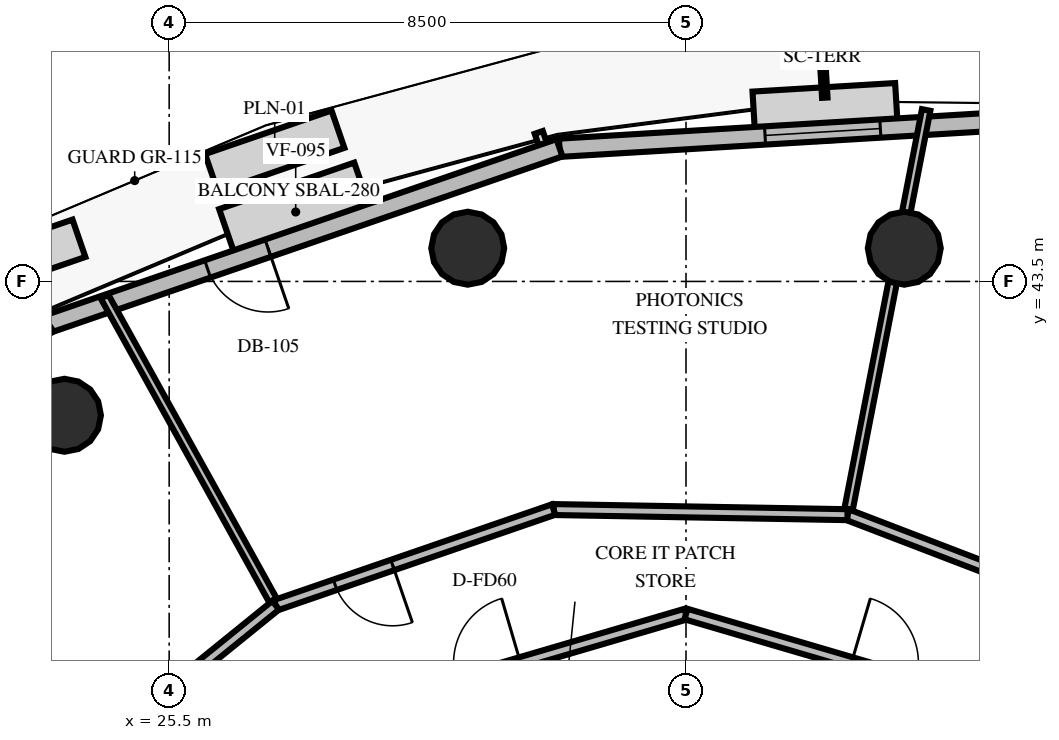
"""IFC4 building model, lengths in metres.
Left out: names, types, materials, properties, quantities, classifications, styles, units other than length and angle.
Written with IfcOpenShell. Run it as: python <this file> out.ifc"""

import sys

from ifc_helpers import new_model, si_unit, direction, frame, frame_2d, origin, origin_2d, place, context, subcontext, project, spatial, rectangle, circle, extrude, element, fill, save


model = new_model("IFC4")
c1 = context("Model", 3, precision=1e-05, world=origin(), true_north=direction((0.0, 1.0)))
c2 = subcontext(c1, "Body", "Model", "MODEL_VIEW")
j1 = project(units=[si_unit("LENGTHUNIT", "METRE"), si_unit("PLANEANGLEUNIT", "RADIAN")], contexts=[c1])
p1 = place(None, origin())
s1 = spatial("IfcSite", under=j1, at=p1, CompositionType="ELEMENT")
p2 = place(p1, origin())
s2 = spatial("IfcBuilding", under=s1, at=p2, CompositionType="ELEMENT")
p3 = place(p2, frame((0.0, 0.0, 113.8)))
s3 = spatial("IfcBuildingStorey", under=s2, at=p3, CompositionType="ELEMENT", Elevation=113.8)
for number, where, z_axis, x_axis in (
    (1, (37.59, 44.046, 0.0), (0.0, 0.0, 1.0), (1.0, 0.0, 0.0)),
    (2, (30.41, 44.046, 0.0), (0.0, 0.0, 1.0), (1.0, 0.0, 0.0)),
    (3, (23.778, 41.299, 0.0), (0.0, 0.0, 1.0), (1.0, 0.0, 0.0)),
):
    element("IfcColumn", number, at=place(p3, frame(where, z_axis=z_axis, x_axis=x_axis)), inside=s3, PredefinedType="COLUMN", context=c2, shape_type="SweptSolid", body=[
        extrude(circle(Radius=0.6, at=origin_2d()), origin(), (0.0, 0.0, 1.0), 4.0),
    ])
p4 = place(p3, frame((40.576, 46.217, 0.0), z_axis=(0.0, 0.0, 1.0), x_axis=(-0.998210999653, -0.059789632646, 0.0)))
e4 = element("IfcWall", 4, at=p4, inside=s3, PredefinedType="SOLIDWALL", context=c2, shape_type="SweptSolid", body=[
    extrude(rectangle(XDim=8.673, YDim=0.3, at=frame_2d((4.336, 0.0))), origin(), (0.0, 0.0, 1.0), 2.9),
])
p5 = place(p4, frame((3.386, 0.0, 0.8)))
e5 = element("IfcOpeningElement", 5, at=p5, cuts=e4, PredefinedType="OPENING", context=c2, shape_type="SweptSolid", body=[
    extrude(rectangle(XDim=1.9, YDim=1.95, at=frame_2d((0.95, 0.975))), frame((0.0, 0.16, 0.0), z_axis=(0.0, -1.0, 0.0), x_axis=(1.0, 0.0, 0.0)), (0.0, 0.0, 1.0), 0.32),
])
p6 = place(p3, frame((31.919, 45.698, 0.0), z_axis=(0.0, 0.0, 1.0), x_axis=(-0.945509178588, -0.325595444079, 0.0)))
e6 = element("IfcWall", 6, at=p6, inside=s3, PredefinedType="SOLIDWALL", context=c2, shape_type="SweptSolid", body=[
    extrude(rectangle(XDim=8.891, YDim=0.3, at=frame_2d((4.445, 0.0))), origin(), (0.0, 0.0, 1.0), 2.9),
])
p7 = place(p6, frame((5.07, 0.0, 0.0)))
e7 = element("IfcOpeningElement", 7, at=p7, cuts=e6, PredefinedType="OPENING", context=c2, shape_type="SweptSolid", body=[
    extrude(rectangle(XDim=1.05, YDim=2.15, at=frame_2d((0.525, 1.075))), frame((0.0, 0.16, 0.0), z_axis=(0.0, -1.0, 0.0), x_axis=(1.0, 0.0, 0.0)), (0.0, 0.0, 1.0), 0.32),
])
p8 = place(p3, frame((23.513, 42.803, 0.0), z_axis=(0.0, 0.0, 1.0), x_axis=(-0.823433656397, -0.567412560235, 0.0)))
e8 = element("IfcWall", 8, at=p8, inside=s3, PredefinedType="SOLIDWALL", context=c2, shape_type="SweptSolid", body=[
    extrude(rectangle(XDim=8.673, YDim=0.3, at=frame_2d((4.336, 0.0))), origin(), (0.0, 0.0, 1.0), 2.9),
])
p9 = place(p8, frame((3.386, 0.0, 0.8)))
e9 = element("IfcOpeningElement", 9, at=p9, cuts=e8, PredefinedType="OPENING", context=c2, shape_type="SweptSolid", body=[
    extrude(rectangle(XDim=1.9, YDim=1.95, at=frame_2d((0.95, 0.975))), frame((0.0, 0.16, 0.0), z_axis=(0.0, -1.0, 0.0), x_axis=(1.0, 0.0, 0.0)), (0.0, 0.0, 1.0), 0.32),
])
p10 = place(p3, frame((27.5, 36.123, 0.0), z_axis=(0.0, 0.0, 1.0), x_axis=(0.959546654541, 0.281549671923, 0.0)))
e10 = element("IfcWall", 10, at=p10, inside=s3, PredefinedType="PARTITIONING", context=c2, shape_type="SweptSolid", body=[
    extrude(rectangle(XDim=6.774, YDim=0.18, at=frame_2d((3.387, 0.0))), origin(), (0.0, 0.0, 1.0), 2.8),
])
p11 = place(p10, frame((2.837, 0.0, 0.0)))
e11 = element("IfcOpeningElement", 11, at=p11, cuts=e10, PredefinedType="OPENING", context=c2, shape_type="SweptSolid", body=[
    extrude(rectangle(XDim=1.1, YDim=2.15, at=frame_2d((0.55, 1.075))), frame((0.0, 0.1, 0.0), z_axis=(0.0, -1.0, 0.0), x_axis=(1.0, 0.0, 0.0)), (0.0, 0.0, 1.0), 0.2),
])
p12 = place(p3, frame((34.0, 38.03, 0.0), z_axis=(0.0, 0.0, 1.0), x_axis=(0.959546654541, -0.281549671923, 0.0)))
e12 = element("IfcWall", 12, at=p12, inside=s3, PredefinedType="PARTITIONING", context=c2, shape_type="SweptSolid", body=[
    extrude(rectangle(XDim=6.774, YDim=0.18, at=frame_2d((3.387, 0.0))), origin(), (0.0, 0.0, 1.0), 2.8),
])
p13 = place(p12, frame((2.837, 0.0, 0.0)))
e13 = element("IfcOpeningElement", 13, at=p13, cuts=e12, PredefinedType="OPENING", context=c2, shape_type="SweptSolid", body=[
    extrude(rectangle(XDim=1.1, YDim=2.15, at=frame_2d((0.55, 1.075))), frame((0.0, 0.1, 0.0), z_axis=(0.0, -1.0, 0.0), x_axis=(1.0, 0.0, 0.0)), (0.0, 0.0, 1.0), 0.2),
])
p14 = place(p3, frame((36.656, 39.664, 0.0), z_axis=(0.0, 0.0, 1.0), x_axis=(0.190815684343, 0.981625883221, 0.0)))
e14 = element("IfcWall", 14, at=p14, inside=s3, PredefinedType="PARTITIONING", context=c2, shape_type="SweptSolid", body=[
    extrude(rectangle(XDim=6.78, YDim=0.14, at=frame_2d((3.39, 0.0))), origin(), (0.0, 0.0, 1.0), 2.8),
])
p15 = place(p3, frame((41.169, 37.932, 0.0), z_axis=(0.0, 0.0, 1.0), x_axis=(-0.933582294394, 0.35836308347, 0.0)))
e15 = element("IfcWall", 15, at=p15, inside=s3, PredefinedType="PARTITIONING", context=c2, shape_type="SweptSolid", body=[
    extrude(rectangle(XDim=4.834, YDim=0.18, at=frame_2d((2.417, 0.0))), origin(), (0.0, 0.0, 1.0), 2.8),
])
p16 = place(p3, frame((27.251, 38.175, 0.0), z_axis=(0.0, 0.0, 1.0), x_axis=(-0.484806879047, 0.874621226605, 0.0)))
e16 = element("IfcWall", 16, at=p16, inside=s3, PredefinedType="PARTITIONING", context=c2, shape_type="SweptSolid", body=[
    extrude(rectangle(XDim=5.803, YDim=0.14, at=frame_2d((2.902, 0.0))), origin(), (0.0, 0.0, 1.0), 2.8),
])
p17 = place(p3, frame((36.656, 39.664, 0.0), z_axis=(0.0, 0.0, 1.0), x_axis=(-0.999848201787, 0.01742335739, 0.0)))
e17 = element("IfcWall", 17, at=p17, inside=s3, PredefinedType="PARTITIONING", context=c2, shape_type="SweptSolid", body=[
    extrude(rectangle(XDim=4.834, YDim=0.18, at=frame_2d((2.417, 0.0))), origin(), (0.0, 0.0, 1.0), 2.8),
])
p18 = place(p3, frame((31.823, 39.749, 0.0), z_axis=(0.0, 0.0, 1.0), x_axis=(-0.945531725064, -0.325529963134, 0.0)))
e18 = element("IfcWall", 18, at=p18, inside=s3, PredefinedType="PARTITIONING", context=c2, shape_type="SweptSolid", body=[
    extrude(rectangle(XDim=4.834, YDim=0.18, at=frame_2d((2.417, 0.0))), origin(), (0.0, 0.0, 1.0), 2.8),
])
p19 = place(p18, frame((2.801, 0.0, 0.0)))
e19 = element("IfcOpeningElement", 19, at=p19, cuts=e18, PredefinedType="OPENING", context=c2, shape_type="SweptSolid", body=[
    extrude(rectangle(XDim=1.0, YDim=2.15, at=frame_2d((0.5, 1.075))), frame((0.0, 0.1, 0.0), z_axis=(0.0, -1.0, 0.0), x_axis=(1.0, 0.0, 0.0)), (0.0, 0.0, 1.0), 0.2),
])
p20 = place(p3, frame((27.251, 38.175, 0.0), z_axis=(0.0, 0.0, 1.0), x_axis=(-0.777140194095, -0.629327513082, 0.0)))
e20 = element("IfcWall", 20, at=p20, inside=s3, PredefinedType="PARTITIONING", context=c2, shape_type="SweptSolid", body=[
    extrude(rectangle(XDim=4.834, YDim=0.18, at=frame_2d((2.417, 0.0))), origin(), (0.0, 0.0, 1.0), 2.8),
])
p21 = place(p20, frame((2.801, 0.0, 0.0)))
e21 = element("IfcOpeningElement", 21, at=p21, cuts=e20, PredefinedType="OPENING", context=c2, shape_type="SweptSolid", body=[
    extrude(rectangle(XDim=1.0, YDim=2.15, at=frame_2d((0.5, 1.075))), frame((0.0, 0.1, 0.0), z_axis=(0.0, -1.0, 0.0), x_axis=(1.0, 0.0, 0.0)), (0.0, 0.0, 1.0), 0.2),
])
p22 = place(p5, origin())
e22 = element("IfcWindow", 22, at=p22, inside=s3, PartitioningType="SINGLE_PANEL", PredefinedType="WINDOW", context=c2, shape_type="SweptSolid", body=[
    extrude(rectangle(XDim=1.9, YDim=1.95, at=frame_2d((0.95, 0.975))), frame((0.0, 0.03, 0.0), z_axis=(0.0, -1.0, 0.0), x_axis=(1.0, 0.0, 0.0)), (0.0, 0.0, 1.0), 0.06),
])
fill(e5, e22)
p23 = place(p7, origin())
e23 = element("IfcDoor", 23, at=p23, inside=s3, OperationType="SINGLE_SWING_LEFT", PredefinedType="DOOR", context=c2, shape_type="SweptSolid", body=[
    extrude(rectangle(XDim=1.05, YDim=2.15, at=frame_2d((0.525, 1.075))), frame((0.0, 0.025, 0.0), z_axis=(0.0, -1.0, 0.0), x_axis=(1.0, 0.0, 0.0)), (0.0, 0.0, 1.0), 0.05),
])
fill(e7, e23)
p24 = place(p19, origin())
e24 = element("IfcDoor", 24, at=p24, inside=s3, OperationType="SINGLE_SWING_LEFT", PredefinedType="DOOR", context=c2, shape_type="SweptSolid", body=[
    extrude(rectangle(XDim=1.0, YDim=2.15, at=frame_2d((0.5, 1.075))), frame((0.0, 0.025, 0.0), z_axis=(0.0, -1.0, 0.0), x_axis=(1.0, 0.0, 0.0)), (0.0, 0.0, 1.0), 0.05),
])
fill(e19, e24)
save(model, sys.argv[1])
